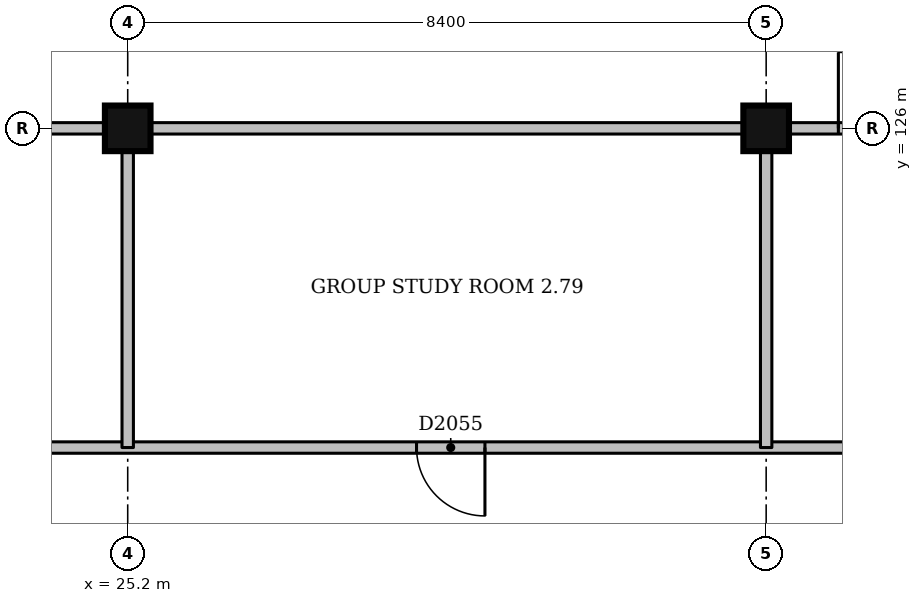
"""IFC4 building model, lengths in metres.
Left out: names, types, materials, properties, quantities, classifications, styles, units other than length and angle.
Written with IfcOpenShell. Run it as: python <this file> out.ifc"""

import sys

from ifc_helpers import new_model, si_unit, direction, frame, frame_2d, origin, origin_2d, place, context, subcontext, project, spatial, rectangle, extrude, element, fill, save


model = new_model("IFC4")
c1 = context("Model", 3, precision=1e-05, world=origin(), true_north=direction((0.0, 1.0)))
c2 = subcontext(c1, "Body", "Model", "MODEL_VIEW")
j1 = project(units=[si_unit("LENGTHUNIT", "METRE"), si_unit("PLANEANGLEUNIT", "RADIAN")], contexts=[c1])
p1 = place(None, origin())
s1 = spatial("IfcSite", under=j1, at=p1, CompositionType="ELEMENT")
p2 = place(p1, origin())
s2 = spatial("IfcBuilding", under=s1, at=p2, CompositionType="ELEMENT")
p3 = place(p2, frame((0.0, 0.0, 9.0)))
s3 = spatial("IfcBuildingStorey", under=s2, at=p3, CompositionType="ELEMENT", Elevation=9.0)
for number, where, z_axis, x_axis in (
    (1, (25.2, 126.0, -1.5), (0.0, 0.0, 1.0), (1.0, 0.0, 0.0)),
    (2, (33.6, 126.0, -1.5), (0.0, 0.0, 1.0), (1.0, 0.0, 0.0)),
):
    element("IfcColumn", number, at=place(p3, frame(where, z_axis=z_axis, x_axis=x_axis)), inside=s3, PredefinedType="COLUMN", context=c2, shape_type="SweptSolid", body=[
        extrude(rectangle(XDim=0.6, YDim=0.6, at=origin_2d()), origin(), (0.0, 0.0, 1.0), 6.0),
    ])
p4 = place(p3, frame((16.8, 121.8, 0.0), z_axis=(0.0, 0.0, 1.0), x_axis=(1.0, 0.0, 0.0)))
e3 = element("IfcWall", 3, at=p4, inside=s3, PredefinedType="PARTITIONING", context=c2, shape_type="SweptSolid", body=[
    extrude(rectangle(XDim=25.2, YDim=0.15, at=frame_2d((12.6, 0.0))), origin(), (0.0, 0.0, 1.0), 3.4),
])
p5 = place(p4, frame((3.8, 0.0, 0.0)))
e4 = element("IfcOpeningElement", 4, at=p5, cuts=e3, PredefinedType="OPENING", context=c2, shape_type="SweptSolid", body=[
    extrude(rectangle(XDim=0.9, YDim=2.1, at=frame_2d((0.45, 1.05))), frame((0.0, 0.085, 0.0), z_axis=(0.0, -1.0, 0.0), x_axis=(1.0, 0.0, 0.0)), (0.0, 0.0, 1.0), 0.17),
])
p6 = place(p4, frame((12.2, 0.0, 0.0)))
e5 = element("IfcOpeningElement", 5, at=p6, cuts=e3, PredefinedType="OPENING", context=c2, shape_type="SweptSolid", body=[
    extrude(rectangle(XDim=0.9, YDim=2.1, at=frame_2d((0.45, 1.05))), frame((0.0, 0.085, 0.0), z_axis=(0.0, -1.0, 0.0), x_axis=(1.0, 0.0, 0.0)), (0.0, 0.0, 1.0), 0.17),
])
p7 = place(p4, frame((20.6, 0.0, 0.0)))
e6 = element("IfcOpeningElement", 6, at=p7, cuts=e3, PredefinedType="OPENING", context=c2, shape_type="SweptSolid", body=[
    extrude(rectangle(XDim=0.9, YDim=2.1, at=frame_2d((0.45, 1.05))), frame((0.0, 0.085, 0.0), z_axis=(0.0, -1.0, 0.0), x_axis=(1.0, 0.0, 0.0)), (0.0, 0.0, 1.0), 0.17),
])
p8 = place(p3, frame((17.125, 126.0, 0.0), z_axis=(0.0, 0.0, 1.0), x_axis=(1.0, 0.0, 0.0)))
e7 = element("IfcWall", 7, at=p8, inside=s3, PredefinedType="PARTITIONING", context=c2, shape_type="SweptSolid", body=[
    extrude(rectangle(XDim=7.775, YDim=0.15, at=frame_2d((3.887, 0.0))), origin(), (0.0, 0.0, 1.0), 3.4),
])
p9 = place(p8, frame((0.3, 0.0, 0.0)))
e8 = element("IfcOpeningElement", 8, at=p9, cuts=e7, PredefinedType="OPENING", context=c2, shape_type="SweptSolid", body=[
    extrude(rectangle(XDim=1.8, YDim=2.1, at=frame_2d((0.9, 1.05))), frame((0.0, 0.085, 0.0), z_axis=(0.0, -1.0, 0.0), x_axis=(1.0, 0.0, 0.0)), (0.0, 0.0, 1.0), 0.17),
])
p10 = place(p3, frame((25.5, 126.0, 0.0), z_axis=(0.0, 0.0, 1.0), x_axis=(1.0, 0.0, 0.0)))
e9 = element("IfcWall", 9, at=p10, inside=s3, PredefinedType="PARTITIONING", context=c2, shape_type="SweptSolid", body=[
    extrude(rectangle(XDim=7.8, YDim=0.15, at=frame_2d((3.9, 0.0))), origin(), (0.0, 0.0, 1.0), 3.4),
])
p11 = place(p3, frame((33.9, 126.0, 0.0), z_axis=(0.0, 0.0, 1.0), x_axis=(1.0, 0.0, 0.0)))
e10 = element("IfcWall", 10, at=p11, inside=s3, PredefinedType="PARTITIONING", context=c2, shape_type="SweptSolid", body=[
    extrude(rectangle(XDim=2.35, YDim=0.15, at=frame_2d((1.175, 0.0))), origin(), (0.0, 0.0, 1.0), 3.4),
])
p12 = place(p11, frame((0.65, 0.0, 0.0)))
e11 = element("IfcOpeningElement", 11, at=p12, cuts=e10, PredefinedType="OPENING", context=c2, shape_type="SweptSolid", body=[
    extrude(rectangle(XDim=1.0, YDim=2.1, at=frame_2d((0.5, 1.05))), frame((0.0, 0.085, 0.0), z_axis=(0.0, -1.0, 0.0), x_axis=(1.0, 0.0, 0.0)), (0.0, 0.0, 1.0), 0.17),
])
p13 = place(p3, frame((25.2, 121.8, 0.0), z_axis=(0.0, 0.0, 1.0), x_axis=(0.0, 1.0, 0.0)))
e12 = element("IfcWall", 12, at=p13, inside=s3, PredefinedType="PARTITIONING", context=c2, shape_type="SweptSolid", body=[
    extrude(rectangle(XDim=3.9, YDim=0.15, at=frame_2d((1.95, 0.0))), origin(), (0.0, 0.0, 1.0), 3.4),
])
p14 = place(p3, frame((33.6, 121.8, 0.0), z_axis=(0.0, 0.0, 1.0), x_axis=(0.0, 1.0, 0.0)))
e13 = element("IfcWall", 13, at=p14, inside=s3, PredefinedType="PARTITIONING", context=c2, shape_type="SweptSolid", body=[
    extrude(rectangle(XDim=3.9, YDim=0.15, at=frame_2d((1.95, 0.0))), origin(), (0.0, 0.0, 1.0), 4.15),
])
p15 = place(p6, origin())
e14 = element("IfcDoor", 14, at=p15, inside=s3, OperationType="SINGLE_SWING_RIGHT", PredefinedType="DOOR", context=c2, shape_type="SweptSolid", body=[
    extrude(rectangle(XDim=0.9, YDim=2.1, at=frame_2d((0.45, 1.05))), frame((0.0, 0.025, 0.0), z_axis=(0.0, -1.0, 0.0), x_axis=(1.0, 0.0, 0.0)), (0.0, 0.0, 1.0), 0.05),
])
fill(e5, e14)
p16 = place(p12, origin())
e15 = element("IfcDoor", 15, at=p16, inside=s3, OperationType="SINGLE_SWING_LEFT", PredefinedType="DOOR", context=c2, shape_type="SweptSolid", body=[
    extrude(rectangle(XDim=1.0, YDim=2.1, at=frame_2d((0.5, 1.05))), frame((0.0, 0.025, 0.0), z_axis=(0.0, -1.0, 0.0), x_axis=(1.0, 0.0, 0.0)), (0.0, 0.0, 1.0), 0.05),
])
fill(e11, e15)
save(model, sys.argv[1])
